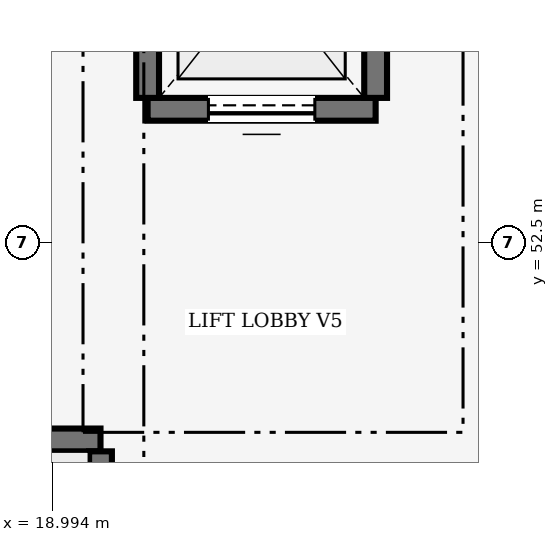
"""IFC4 building model, lengths in metres.
Left out: names, types, materials, properties, quantities, classifications, styles, units other than length and angle.
Written with IfcOpenShell. Run it as: python <this file> out.ifc"""

import sys

from ifc_helpers import new_model, si_unit, direction, frame, frame_2d, origin, place, context, subcontext, project, spatial, rectangle, extrude, element, fill, save


model = new_model("IFC4")
c1 = context("Model", 3, precision=1e-05, world=origin(), true_north=direction((0.0, 1.0)))
c2 = subcontext(c1, "Body", "Model", "MODEL_VIEW")
j1 = project(units=[si_unit("LENGTHUNIT", "METRE"), si_unit("PLANEANGLEUNIT", "RADIAN")], contexts=[c1])
p1 = place(None, origin())
s1 = spatial("IfcSite", under=j1, at=p1, CompositionType="ELEMENT")
p2 = place(p1, origin())
s2 = spatial("IfcBuilding", under=s1, at=p2, CompositionType="ELEMENT")
p3 = place(p2, frame((0.0, 0.0, 4.5)))
s3 = spatial("IfcBuildingStorey", under=s2, at=p3, CompositionType="ELEMENT", Elevation=4.5)
p4 = place(p3, frame((9.45, 49.9, 0.0), z_axis=(0.0, 0.0, 1.0), x_axis=(1.0, 0.0, 0.0)))
e1 = element("IfcWall", 1, at=p4, inside=s3, PredefinedType="SHEAR", context=c2, shape_type="SweptSolid", body=[
    extrude(rectangle(XDim=10.18, YDim=0.3, at=frame_2d((5.09, 0.0))), origin(), (0.0, 0.0, 1.0), 3.65),
])
p5 = place(p3, frame((19.63, 49.75, 0.0), z_axis=(0.0, 0.0, 1.0), x_axis=(0.0, -1.0, 0.0)))
e2 = element("IfcWall", 2, at=p5, inside=s3, PredefinedType="SHEAR", context=c2, shape_type="SweptSolid", body=[
    extrude(rectangle(XDim=4.15, YDim=0.3, at=frame_2d((2.075, 0.0))), origin(), (0.0, 0.0, 1.0), 3.65),
])
p6 = place(p3, frame((23.25, 54.25, 0.0), z_axis=(0.0, 0.0, 1.0), x_axis=(-1.0, 0.0, 0.0)))
e3 = element("IfcWall", 3, at=p6, inside=s3, PredefinedType="SHEAR", context=c2, shape_type="SweptSolid", body=[
    extrude(rectangle(XDim=3.0, YDim=0.3, at=frame_2d((1.5, 0.0))), origin(), (0.0, 0.0, 1.0), 3.65),
])
p7 = place(p6, frame((0.8, 0.0, 0.0)))
e4 = element("IfcOpeningElement", 4, at=p7, cuts=e3, PredefinedType="OPENING", context=c2, shape_type="SweptSolid", body=[
    extrude(rectangle(XDim=1.4, YDim=2.2, at=frame_2d((0.7, 1.1))), frame((0.0, 0.15, 0.0), z_axis=(0.0, -1.0, 0.0), x_axis=(1.0, 0.0, 0.0)), (0.0, 0.0, 1.0), 0.3),
])
for number, where, z_axis, x_axis in (
    (5, (20.25, 54.4, 0.0), (0.0, 0.0, 1.0), (0.0, 1.0, 0.0)),
    (6, (23.25, 57.7, 0.0), (0.0, 0.0, 1.0), (0.0, -1.0, 0.0)),
):
    element("IfcWall", number, at=place(p3, frame(where, z_axis=z_axis, x_axis=x_axis)), inside=s3, PredefinedType="SHEAR", context=c2, shape_type="SweptSolid", body=[
        extrude(rectangle(XDim=3.3, YDim=0.3, at=frame_2d((1.65, 0.0))), origin(), (0.0, 0.0, 1.0), 3.65),
    ])
p8 = place(p7, origin())
e7 = element("IfcDoor", 7, at=p8, inside=s3, OperationType="DOUBLE_DOOR_SLIDING", PredefinedType="DOOR", context=c2, shape_type="SweptSolid", body=[
    extrude(rectangle(XDim=1.4, YDim=2.2, at=frame_2d((0.7, 1.1))), frame((0.0, 0.025, 0.0), z_axis=(0.0, -1.0, 0.0), x_axis=(1.0, 0.0, 0.0)), (0.0, 0.0, 1.0), 0.05),
])
fill(e4, e7)
save(model, sys.argv[1])
